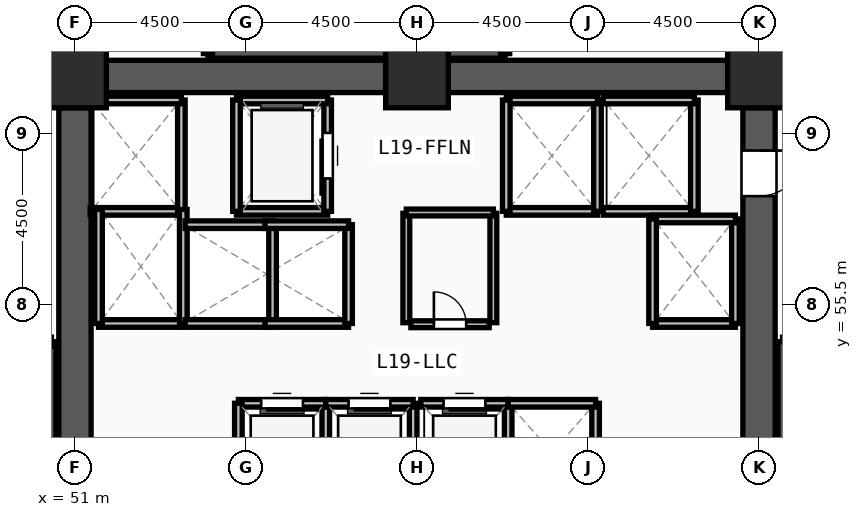
"""IFC4 building model, lengths in metres.
Left out: names, types, materials, properties, quantities, classifications, styles, units other than length and angle.
Written with IfcOpenShell. Run it as: python <this file> out.ifc"""

import sys

from ifc_helpers import new_model, si_unit, direction, frame, frame_2d, origin, origin_2d, place, context, subcontext, project, spatial, rectangle, extrude, source, transform, mapped, element, fill, save


model = new_model("IFC4")
c1 = context("Model", 3, precision=1e-05, world=origin(), true_north=direction((0.0, 1.0)))
c2 = subcontext(c1, "Body", "Model", "MODEL_VIEW")
j1 = project(units=[si_unit("LENGTHUNIT", "METRE"), si_unit("PLANEANGLEUNIT", "RADIAN")], contexts=[c1])
p1 = place(None, origin())
s1 = spatial("IfcSite", under=j1, at=p1, CompositionType="ELEMENT")
p2 = place(p1, origin())
s2 = spatial("IfcBuilding", under=s1, at=p2, CompositionType="ELEMENT")
p3 = place(p2, frame((0.0, 0.0, 74.25)))
s3 = spatial("IfcBuildingStorey", under=s2, at=p3, CompositionType="ELEMENT", Elevation=74.25)
m1 = source(origin(), c2, "Body", "SweptSolid", [
    extrude(rectangle(XDim=1.65, YDim=1.65, at=origin_2d()), origin(), (0.0, 0.0, 1.0), 3.75),
])
for number, where, z_axis, x_axis in (
    (1, (69.0, 61.5, 0.0), (0.0, 0.0, 1.0), (1.0, 0.0, 0.0)),
    (2, (60.0, 61.5, 0.0), (0.0, 0.0, 1.0), (1.0, 0.0, 0.0)),
    (3, (51.0, 61.5, 0.0), (0.0, 0.0, 1.0), (1.0, 0.0, 0.0)),
):
    element("IfcColumn", number, at=place(p3, frame(where, z_axis=z_axis, x_axis=x_axis)), inside=s3, PredefinedType="COLUMN", context=c2, shape_type="MappedRepresentation", body=[
        mapped(m1, transform((0.0, 0.0, 0.0), x_axis=(1.0, 0.0, 0.0), y_axis=(0.0, 1.0, 0.0), z_axis=(0.0, 0.0, 1.0), scale=1.0)),
    ])
for number, where, z_axis, x_axis in (
    (4, (51.825, 61.5, 0.0), (0.0, 0.0, 1.0), (1.0, 0.0, 0.0)),
    (5, (60.825, 61.5, 0.0), (0.0, 0.0, 1.0), (1.0, 0.0, 0.0)),
):
    element("IfcWall", number, at=place(p3, frame(where, z_axis=z_axis, x_axis=x_axis)), inside=s3, PredefinedType="SHEAR", context=c2, shape_type="SweptSolid", body=[
        extrude(rectangle(XDim=7.35, YDim=0.85, at=frame_2d((3.675, 0.0))), origin(), (0.0, 0.0, 1.0), 3.57),
    ])
p4 = place(p3, frame((69.0, 60.675, 0.0), z_axis=(0.0, 0.0, 1.0), x_axis=(0.0, -1.0, 0.0)))
e6 = element("IfcWall", 6, at=p4, inside=s3, PredefinedType="SHEAR", context=c2, shape_type="SweptSolid", body=[
    extrude(rectangle(XDim=13.35, YDim=0.85, at=frame_2d((6.675, 0.0))), origin(), (0.0, 0.0, 1.0), 3.57),
])
m2 = source(origin(), c2, "Body", "SweptSolid", [
    extrude(rectangle(XDim=1.2, YDim=2.2, at=frame_2d((0.6, 1.1))), frame((0.0, 0.435, 0.0), z_axis=(0.0, -1.0, 0.0), x_axis=(1.0, 0.0, 0.0)), (0.0, 0.0, 1.0), 0.87),
])
p5 = place(p4, frame((1.125, 0.0, 0.0)))
e7 = element("IfcOpeningElement", 7, at=p5, cuts=e6, PredefinedType="OPENING", context=c2, shape_type="MappedRepresentation", body=[
    mapped(m2, transform((0.0, 0.0, 0.0), x_axis=(1.0, 0.0, 0.0), y_axis=(0.0, 1.0, 0.0), z_axis=(0.0, 0.0, 1.0), scale=1.0)),
])
p6 = place(p3, frame((51.0, 47.325, 0.0), z_axis=(0.0, 0.0, 1.0), x_axis=(0.0, 1.0, 0.0)))
e8 = element("IfcWall", 8, at=p6, inside=s3, PredefinedType="SHEAR", context=c2, shape_type="SweptSolid", body=[
    extrude(rectangle(XDim=13.35, YDim=0.85, at=frame_2d((6.675, 0.0))), origin(), (0.0, 0.0, 1.0), 3.57),
])
for number, where, z_axis, x_axis in (
    (9, (50.38, 46.7, 0.0), (0.0, 0.0, 1.0), (0.0, 1.0, 0.0)),
    (10, (69.62, 54.52, 0.0), (0.0, 0.0, 1.0), (0.0, -1.0, 0.0)),
    (11, (54.5, 62.1, 0.0), (0.0, 0.0, 1.0), (1.0, 0.0, 0.0)),
):
    element("IfcWall", number, at=place(p3, frame(where, z_axis=z_axis, x_axis=x_axis)), inside=s3, PredefinedType="SOLIDWALL", context=c2, shape_type="SweptSolid", body=[
        extrude(rectangle(XDim=7.82, YDim=0.24, at=frame_2d((3.91, 0.0))), origin(), (0.0, 0.0, 1.0), 3.57),
    ])
for number, where, z_axis, x_axis in (
    (12, (62.32, 62.1, 0.0), (0.0, 0.0, 1.0), (0.0, 1.0, 0.0)),
    (13, (54.5, 65.54, 0.0), (0.0, 0.0, 1.0), (0.0, -1.0, 0.0)),
):
    element("IfcWall", number, at=place(p3, frame(where, z_axis=z_axis, x_axis=x_axis)), inside=s3, PredefinedType="SOLIDWALL", context=c2, shape_type="SweptSolid", body=[
        extrude(rectangle(XDim=3.44, YDim=0.24, at=frame_2d((1.72, 0.0))), origin(), (0.0, 0.0, 1.0), 3.57),
    ])
p7 = place(p3, frame((55.25, 57.95, 0.0), z_axis=(0.0, 0.0, 1.0), x_axis=(1.0, 0.0, 0.0)))
e14 = element("IfcWall", 14, at=p7, inside=s3, PredefinedType="SOLIDWALL", context=c2, shape_type="SweptSolid", body=[
    extrude(rectangle(XDim=2.4, YDim=0.2, at=frame_2d((1.2, 0.0))), origin(), (0.0, 0.0, 1.0), 3.57),
])
p8 = place(p3, frame((57.65, 57.95, 0.0), z_axis=(0.0, 0.0, 1.0), x_axis=(0.0, 1.0, 0.0)))
e15 = element("IfcWall", 15, at=p8, inside=s3, PredefinedType="SOLIDWALL", context=c2, shape_type="SweptSolid", body=[
    extrude(rectangle(XDim=2.93, YDim=0.2, at=frame_2d((1.465, 0.0))), origin(), (0.0, 0.0, 1.0), 3.57),
])
m3 = source(origin(), c2, "Body", "SweptSolid", [
    extrude(rectangle(XDim=1.2, YDim=2.3, at=frame_2d((0.6, 1.15))), frame((0.0, 0.11, 0.0), z_axis=(0.0, -1.0, 0.0), x_axis=(1.0, 0.0, 0.0)), (0.0, 0.0, 1.0), 0.22),
])
p9 = place(p8, frame((0.865, 0.0, 0.0)))
e16 = element("IfcOpeningElement", 16, at=p9, cuts=e15, PredefinedType="OPENING", context=c2, shape_type="MappedRepresentation", body=[
    mapped(m3, transform((0.0, 0.0, 0.0), x_axis=(1.0, 0.0, 0.0), y_axis=(0.0, 1.0, 0.0), z_axis=(0.0, 0.0, 1.0), scale=1.0)),
])
p10 = place(p3, frame((57.65, 60.88, 0.0), z_axis=(0.0, 0.0, 1.0), x_axis=(-1.0, 0.0, 0.0)))
e17 = element("IfcWall", 17, at=p10, inside=s3, PredefinedType="SOLIDWALL", context=c2, shape_type="SweptSolid", body=[
    extrude(rectangle(XDim=2.4, YDim=0.2, at=frame_2d((1.2, 0.0))), origin(), (0.0, 0.0, 1.0), 3.57),
])
p11 = place(p3, frame((55.25, 60.88, 0.0), z_axis=(0.0, 0.0, 1.0), x_axis=(0.0, -1.0, 0.0)))
e18 = element("IfcWall", 18, at=p11, inside=s3, PredefinedType="SOLIDWALL", context=c2, shape_type="SweptSolid", body=[
    extrude(rectangle(XDim=2.93, YDim=0.2, at=frame_2d((1.465, 0.0))), origin(), (0.0, 0.0, 1.0), 3.57),
])
p12 = place(p3, frame((62.35, 57.95, 0.0), z_axis=(0.0, 0.0, 1.0), x_axis=(1.0, 0.0, 0.0)))
e19 = element("IfcWall", 19, at=p12, inside=s3, PredefinedType="SOLIDWALL", context=c2, shape_type="SweptSolid", body=[
    extrude(rectangle(XDim=2.4, YDim=0.2, at=frame_2d((1.2, 0.0))), origin(), (0.0, 0.0, 1.0), 3.57),
])
p13 = place(p3, frame((64.75, 57.95, 0.0), z_axis=(0.0, 0.0, 1.0), x_axis=(0.0, 1.0, 0.0)))
e20 = element("IfcWall", 20, at=p13, inside=s3, PredefinedType="SOLIDWALL", context=c2, shape_type="SweptSolid", body=[
    extrude(rectangle(XDim=2.93, YDim=0.2, at=frame_2d((1.465, 0.0))), origin(), (0.0, 0.0, 1.0), 3.57),
])
p14 = place(p3, frame((64.75, 60.88, 0.0), z_axis=(0.0, 0.0, 1.0), x_axis=(-1.0, 0.0, 0.0)))
e21 = element("IfcWall", 21, at=p14, inside=s3, PredefinedType="SOLIDWALL", context=c2, shape_type="SweptSolid", body=[
    extrude(rectangle(XDim=2.4, YDim=0.2, at=frame_2d((1.2, 0.0))), origin(), (0.0, 0.0, 1.0), 3.57),
])
p15 = place(p3, frame((62.35, 60.88, 0.0), z_axis=(0.0, 0.0, 1.0), x_axis=(0.0, -1.0, 0.0)))
e22 = element("IfcWall", 22, at=p15, inside=s3, PredefinedType="SOLIDWALL", context=c2, shape_type="SweptSolid", body=[
    extrude(rectangle(XDim=2.93, YDim=0.2, at=frame_2d((1.465, 0.0))), origin(), (0.0, 0.0, 1.0), 3.57),
])
p16 = place(p3, frame((64.9, 57.95, 0.0), z_axis=(0.0, 0.0, 1.0), x_axis=(1.0, 0.0, 0.0)))
e23 = element("IfcWall", 23, at=p16, inside=s3, PredefinedType="SOLIDWALL", context=c2, shape_type="SweptSolid", body=[
    extrude(rectangle(XDim=2.4, YDim=0.2, at=frame_2d((1.2, 0.0))), origin(), (0.0, 0.0, 1.0), 3.57),
])
p17 = place(p3, frame((67.3, 57.95, 0.0), z_axis=(0.0, 0.0, 1.0), x_axis=(0.0, 1.0, 0.0)))
e24 = element("IfcWall", 24, at=p17, inside=s3, PredefinedType="SOLIDWALL", context=c2, shape_type="SweptSolid", body=[
    extrude(rectangle(XDim=2.93, YDim=0.2, at=frame_2d((1.465, 0.0))), origin(), (0.0, 0.0, 1.0), 3.57),
])
for number, where, z_axis, x_axis in (
    (25, (67.3, 60.88, 0.0), (0.0, 0.0, 1.0), (-1.0, 0.0, 0.0)),
    (26, (51.4, 57.95, 0.0), (0.0, 0.0, 1.0), (1.0, 0.0, 0.0)),
):
    element("IfcWall", number, at=place(p3, frame(where, z_axis=z_axis, x_axis=x_axis)), inside=s3, PredefinedType="SOLIDWALL", context=c2, shape_type="SweptSolid", body=[
        extrude(rectangle(XDim=2.4, YDim=0.2, at=frame_2d((1.2, 0.0))), origin(), (0.0, 0.0, 1.0), 3.57),
    ])
p18 = place(p3, frame((53.8, 57.95, 0.0), z_axis=(0.0, 0.0, 1.0), x_axis=(0.0, 1.0, 0.0)))
e27 = element("IfcWall", 27, at=p18, inside=s3, PredefinedType="SOLIDWALL", context=c2, shape_type="SweptSolid", body=[
    extrude(rectangle(XDim=2.93, YDim=0.2, at=frame_2d((1.465, 0.0))), origin(), (0.0, 0.0, 1.0), 3.57),
])
p19 = place(p3, frame((53.8, 60.88, 0.0), z_axis=(0.0, 0.0, 1.0), x_axis=(-1.0, 0.0, 0.0)))
e28 = element("IfcWall", 28, at=p19, inside=s3, PredefinedType="SOLIDWALL", context=c2, shape_type="SweptSolid", body=[
    extrude(rectangle(XDim=2.4, YDim=0.2, at=frame_2d((1.2, 0.0))), origin(), (0.0, 0.0, 1.0), 3.57),
])
p20 = place(p3, frame((51.62, 55.0, 0.0), z_axis=(0.0, 0.0, 1.0), x_axis=(1.0, 0.0, 0.0)))
e29 = element("IfcWall", 29, at=p20, inside=s3, PredefinedType="SOLIDWALL", context=c2, shape_type="SweptSolid", body=[
    extrude(rectangle(XDim=2.23, YDim=0.2, at=frame_2d((1.115, 0.0))), origin(), (0.0, 0.0, 1.0), 3.57),
])
for number, where, z_axis, x_axis in (
    (30, (53.85, 55.0, 0.0), (0.0, 0.0, 1.0), (0.0, 1.0, 0.0)),
    (31, (51.62, 58.0, 0.0), (0.0, 0.0, 1.0), (0.0, -1.0, 0.0)),
):
    element("IfcWall", number, at=place(p3, frame(where, z_axis=z_axis, x_axis=x_axis)), inside=s3, PredefinedType="SOLIDWALL", context=c2, shape_type="SweptSolid", body=[
        extrude(rectangle(XDim=3.0, YDim=0.2, at=frame_2d((1.5, 0.0))), origin(), (0.0, 0.0, 1.0), 3.57),
    ])
p21 = place(p3, frame((66.2, 55.0, 0.0), z_axis=(0.0, 0.0, 1.0), x_axis=(1.0, 0.0, 0.0)))
e32 = element("IfcWall", 32, at=p21, inside=s3, PredefinedType="SOLIDWALL", context=c2, shape_type="SweptSolid", body=[
    extrude(rectangle(XDim=2.18, YDim=0.2, at=frame_2d((1.09, 0.0))), origin(), (0.0, 0.0, 1.0), 3.57),
])
p22 = place(p3, frame((68.38, 55.0, 0.0), z_axis=(0.0, 0.0, 1.0), x_axis=(0.0, 1.0, 0.0)))
e33 = element("IfcWall", 33, at=p22, inside=s3, PredefinedType="SOLIDWALL", context=c2, shape_type="SweptSolid", body=[
    extrude(rectangle(XDim=2.75, YDim=0.2, at=frame_2d((1.375, 0.0))), origin(), (0.0, 0.0, 1.0), 3.57),
])
p23 = place(p3, frame((68.38, 57.75, 0.0), z_axis=(0.0, 0.0, 1.0), x_axis=(-1.0, 0.0, 0.0)))
e34 = element("IfcWall", 34, at=p23, inside=s3, PredefinedType="SOLIDWALL", context=c2, shape_type="SweptSolid", body=[
    extrude(rectangle(XDim=2.18, YDim=0.2, at=frame_2d((1.09, 0.0))), origin(), (0.0, 0.0, 1.0), 3.57),
])
p24 = place(p3, frame((66.2, 57.75, 0.0), z_axis=(0.0, 0.0, 1.0), x_axis=(0.0, -1.0, 0.0)))
e35 = element("IfcWall", 35, at=p24, inside=s3, PredefinedType="SOLIDWALL", context=c2, shape_type="SweptSolid", body=[
    extrude(rectangle(XDim=2.75, YDim=0.2, at=frame_2d((1.375, 0.0))), origin(), (0.0, 0.0, 1.0), 3.57),
])
p25 = place(p3, frame((57.6, 50.3, 0.0), z_axis=(0.0, 0.0, 1.0), x_axis=(0.0, 1.0, 0.0)))
e36 = element("IfcWall", 36, at=p25, inside=s3, PredefinedType="SOLIDWALL", context=c2, shape_type="SweptSolid", body=[
    extrude(rectangle(XDim=2.6, YDim=0.2, at=frame_2d((1.3, 0.0))), origin(), (0.0, 0.0, 1.0), 3.57),
])
p26 = place(p3, frame((57.6, 52.9, 0.0), z_axis=(0.0, 0.0, 1.0), x_axis=(-1.0, 0.0, 0.0)))
e37 = element("IfcWall", 37, at=p26, inside=s3, PredefinedType="SOLIDWALL", context=c2, shape_type="SweptSolid", body=[
    extrude(rectangle(XDim=2.3, YDim=0.2, at=frame_2d((1.15, 0.0))), origin(), (0.0, 0.0, 1.0), 3.57),
])
m4 = source(origin(), c2, "Body", "SweptSolid", [
    extrude(rectangle(XDim=1.1, YDim=2.2, at=frame_2d((0.55, 1.1))), frame((0.0, 0.11, 0.0), z_axis=(0.0, -1.0, 0.0), x_axis=(1.0, 0.0, 0.0)), (0.0, 0.0, 1.0), 0.22),
])
p27 = place(p26, frame((0.6, 0.0, 0.0)))
e38 = element("IfcOpeningElement", 38, at=p27, cuts=e37, PredefinedType="OPENING", context=c2, shape_type="MappedRepresentation", body=[
    mapped(m4, transform((0.0, 0.0, 0.0), x_axis=(1.0, 0.0, 0.0), y_axis=(0.0, 1.0, 0.0), z_axis=(0.0, 0.0, 1.0), scale=1.0)),
])
for number, where, z_axis, x_axis in (
    (39, (55.3, 52.9, 0.0), (0.0, 0.0, 1.0), (0.0, -1.0, 0.0)),
    (40, (59.9, 50.3, 0.0), (0.0, 0.0, 1.0), (0.0, 1.0, 0.0)),
):
    element("IfcWall", number, at=place(p3, frame(where, z_axis=z_axis, x_axis=x_axis)), inside=s3, PredefinedType="SOLIDWALL", context=c2, shape_type="SweptSolid", body=[
        extrude(rectangle(XDim=2.6, YDim=0.2, at=frame_2d((1.3, 0.0))), origin(), (0.0, 0.0, 1.0), 3.57),
    ])
p28 = place(p3, frame((59.9, 52.9, 0.0), z_axis=(0.0, 0.0, 1.0), x_axis=(-1.0, 0.0, 0.0)))
e41 = element("IfcWall", 41, at=p28, inside=s3, PredefinedType="SOLIDWALL", context=c2, shape_type="SweptSolid", body=[
    extrude(rectangle(XDim=2.3, YDim=0.2, at=frame_2d((1.15, 0.0))), origin(), (0.0, 0.0, 1.0), 3.57),
])
p29 = place(p28, frame((0.6, 0.0, 0.0)))
e42 = element("IfcOpeningElement", 42, at=p29, cuts=e41, PredefinedType="OPENING", context=c2, shape_type="MappedRepresentation", body=[
    mapped(m4, transform((0.0, 0.0, 0.0), x_axis=(1.0, 0.0, 0.0), y_axis=(0.0, 1.0, 0.0), z_axis=(0.0, 0.0, 1.0), scale=1.0)),
])
p30 = place(p3, frame((62.4, 50.3, 0.0), z_axis=(0.0, 0.0, 1.0), x_axis=(0.0, 1.0, 0.0)))
e43 = element("IfcWall", 43, at=p30, inside=s3, PredefinedType="SOLIDWALL", context=c2, shape_type="SweptSolid", body=[
    extrude(rectangle(XDim=2.6, YDim=0.2, at=frame_2d((1.3, 0.0))), origin(), (0.0, 0.0, 1.0), 3.57),
])
p31 = place(p3, frame((62.4, 52.9, 0.0), z_axis=(0.0, 0.0, 1.0), x_axis=(-1.0, 0.0, 0.0)))
e44 = element("IfcWall", 44, at=p31, inside=s3, PredefinedType="SOLIDWALL", context=c2, shape_type="SweptSolid", body=[
    extrude(rectangle(XDim=2.3, YDim=0.2, at=frame_2d((1.15, 0.0))), origin(), (0.0, 0.0, 1.0), 3.57),
])
p32 = place(p31, frame((0.6, 0.0, 0.0)))
e45 = element("IfcOpeningElement", 45, at=p32, cuts=e44, PredefinedType="OPENING", context=c2, shape_type="MappedRepresentation", body=[
    mapped(m4, transform((0.0, 0.0, 0.0), x_axis=(1.0, 0.0, 0.0), y_axis=(0.0, 1.0, 0.0), z_axis=(0.0, 0.0, 1.0), scale=1.0)),
])
p33 = place(p3, frame((64.7, 50.3, 0.0), z_axis=(0.0, 0.0, 1.0), x_axis=(0.0, 1.0, 0.0)))
e46 = element("IfcWall", 46, at=p33, inside=s3, PredefinedType="SOLIDWALL", context=c2, shape_type="SweptSolid", body=[
    extrude(rectangle(XDim=2.6, YDim=0.2, at=frame_2d((1.3, 0.0))), origin(), (0.0, 0.0, 1.0), 3.57),
])
for number, where, z_axis, x_axis in (
    (47, (64.7, 52.9, 0.0), (0.0, 0.0, 1.0), (-1.0, 0.0, 0.0)),
    (48, (53.9, 55.0, 0.0), (0.0, 0.0, 1.0), (1.0, 0.0, 0.0)),
):
    element("IfcWall", number, at=place(p3, frame(where, z_axis=z_axis, x_axis=x_axis)), inside=s3, PredefinedType="SOLIDWALL", context=c2, shape_type="SweptSolid", body=[
        extrude(rectangle(XDim=2.3, YDim=0.2, at=frame_2d((1.15, 0.0))), origin(), (0.0, 0.0, 1.0), 3.57),
    ])
p34 = place(p3, frame((56.2, 55.0, 0.0), z_axis=(0.0, 0.0, 1.0), x_axis=(0.0, 1.0, 0.0)))
e49 = element("IfcWall", 49, at=p34, inside=s3, PredefinedType="SOLIDWALL", context=c2, shape_type="SweptSolid", body=[
    extrude(rectangle(XDim=2.6, YDim=0.2, at=frame_2d((1.3, 0.0))), origin(), (0.0, 0.0, 1.0), 3.57),
])
p35 = place(p3, frame((56.2, 57.6, 0.0), z_axis=(0.0, 0.0, 1.0), x_axis=(-1.0, 0.0, 0.0)))
e50 = element("IfcWall", 50, at=p35, inside=s3, PredefinedType="SOLIDWALL", context=c2, shape_type="SweptSolid", body=[
    extrude(rectangle(XDim=2.3, YDim=0.2, at=frame_2d((1.15, 0.0))), origin(), (0.0, 0.0, 1.0), 3.57),
])
p36 = place(p3, frame((56.0, 55.0, 0.0), z_axis=(0.0, 0.0, 1.0), x_axis=(1.0, 0.0, 0.0)))
e51 = element("IfcWall", 51, at=p36, inside=s3, PredefinedType="SOLIDWALL", context=c2, shape_type="SweptSolid", body=[
    extrude(rectangle(XDim=2.2, YDim=0.2, at=frame_2d((1.1, 0.0))), origin(), (0.0, 0.0, 1.0), 3.57),
])
p37 = place(p3, frame((58.2, 55.0, 0.0), z_axis=(0.0, 0.0, 1.0), x_axis=(0.0, 1.0, 0.0)))
e52 = element("IfcWall", 52, at=p37, inside=s3, PredefinedType="SOLIDWALL", context=c2, shape_type="SweptSolid", body=[
    extrude(rectangle(XDim=2.6, YDim=0.2, at=frame_2d((1.3, 0.0))), origin(), (0.0, 0.0, 1.0), 3.57),
])
p38 = place(p3, frame((58.2, 57.6, 0.0), z_axis=(0.0, 0.0, 1.0), x_axis=(-1.0, 0.0, 0.0)))
e53 = element("IfcWall", 53, at=p38, inside=s3, PredefinedType="SOLIDWALL", context=c2, shape_type="SweptSolid", body=[
    extrude(rectangle(XDim=2.2, YDim=0.2, at=frame_2d((1.1, 0.0))), origin(), (0.0, 0.0, 1.0), 3.57),
])
p39 = place(p3, frame((59.84, 54.98, 0.0), z_axis=(0.0, 0.0, 1.0), x_axis=(1.0, 0.0, 0.0)))
e54 = element("IfcWall", 54, at=p39, inside=s3, PredefinedType="PARTITIONING", context=c2, shape_type="SweptSolid", body=[
    extrude(rectangle(XDim=2.06, YDim=0.18, at=frame_2d((1.03, 0.0))), origin(), (0.0, 0.0, 1.0), 3.57),
])
m5 = source(origin(), c2, "Body", "SweptSolid", [
    extrude(rectangle(XDim=0.85, YDim=2.1, at=frame_2d((0.425, 1.05))), frame((0.0, 0.1, 0.0), z_axis=(0.0, -1.0, 0.0), x_axis=(1.0, 0.0, 0.0)), (0.0, 0.0, 1.0), 0.2),
])
p40 = place(p39, frame((0.605, 0.0, 0.0)))
e55 = element("IfcOpeningElement", 55, at=p40, cuts=e54, PredefinedType="OPENING", context=c2, shape_type="MappedRepresentation", body=[
    mapped(m5, transform((0.0, 0.0, 0.0), x_axis=(1.0, 0.0, 0.0), y_axis=(0.0, 1.0, 0.0), z_axis=(0.0, 0.0, 1.0), scale=1.0)),
])
for number, where, z_axis, x_axis in (
    (56, (59.72, 55.02, 0.0), (0.0, 0.0, 1.0), (0.0, 1.0, 0.0)),
    (57, (62.01, 55.02, 0.0), (0.0, 0.0, 1.0), (0.0, 1.0, 0.0)),
):
    element("IfcWall", number, at=place(p3, frame(where, z_axis=z_axis, x_axis=x_axis)), inside=s3, PredefinedType="PARTITIONING", context=c2, shape_type="SweptSolid", body=[
        extrude(rectangle(XDim=2.88, YDim=0.18, at=frame_2d((1.44, 0.0))), origin(), (0.0, 0.0, 1.0), 3.57),
    ])
p41 = place(p3, frame((59.72, 57.92, 0.0), z_axis=(0.0, 0.0, 1.0), x_axis=(1.0, 0.0, 0.0)))
e58 = element("IfcWall", 58, at=p41, inside=s3, PredefinedType="PARTITIONING", context=c2, shape_type="SweptSolid", body=[
    extrude(rectangle(XDim=2.29, YDim=0.18, at=frame_2d((1.145, 0.0))), origin(), (0.0, 0.0, 1.0), 3.57),
])
for number, where, z_axis, x_axis in (
    (59, (50.54, 61.95, 0.0), (0.0, 0.0, 1.0), (0.0, 1.0, 0.0)),
    (60, (69.46, 61.95, 0.0), (0.0, 0.0, 1.0), (0.0, 1.0, 0.0)),
):
    element("IfcWall", number, at=place(p3, frame(where, z_axis=z_axis, x_axis=x_axis)), inside=s3, PredefinedType="PARTITIONING", context=c2, shape_type="SweptSolid", body=[
        extrude(rectangle(XDim=3.63, YDim=0.18, at=frame_2d((1.815, 0.0))), origin(), (0.0, 0.0, 1.0), 3.57),
    ])
m6 = source(origin(), c2, "Body", "SweptSolid", [
    extrude(rectangle(XDim=1.2, YDim=2.2, at=frame_2d((0.6, 1.1))), frame((0.0, 0.025, 0.0), z_axis=(0.0, -1.0, 0.0), x_axis=(1.0, 0.0, 0.0)), (0.0, 0.0, 1.0), 0.05),
])
p42 = place(p5, origin())
e61 = element("IfcDoor", 61, at=p42, inside=s3, OperationType="SINGLE_SWING_LEFT", PredefinedType="DOOR", context=c2, shape_type="MappedRepresentation", body=[
    mapped(m6, transform((0.0, 0.0, 0.0), x_axis=(1.0, 0.0, 0.0), y_axis=(0.0, 1.0, 0.0), z_axis=(0.0, 0.0, 1.0), scale=1.0)),
])
fill(e7, e61)
m7 = source(origin(), c2, "Body", "SweptSolid", [
    extrude(rectangle(XDim=1.2, YDim=2.3, at=frame_2d((0.6, 1.15))), frame((0.0, 0.025, 0.0), z_axis=(0.0, -1.0, 0.0), x_axis=(1.0, 0.0, 0.0)), (0.0, 0.0, 1.0), 0.05),
])
p43 = place(p9, origin())
e62 = element("IfcDoor", 62, at=p43, inside=s3, OperationType="SLIDING_TO_LEFT", PredefinedType="DOOR", context=c2, shape_type="MappedRepresentation", body=[
    mapped(m7, transform((0.0, 0.0, 0.0), x_axis=(1.0, 0.0, 0.0), y_axis=(0.0, 1.0, 0.0), z_axis=(0.0, 0.0, 1.0), scale=1.0)),
])
fill(e16, e62)
m8 = source(origin(), c2, "Body", "SweptSolid", [
    extrude(rectangle(XDim=1.1, YDim=2.2, at=frame_2d((0.55, 1.1))), frame((0.0, 0.025, 0.0), z_axis=(0.0, -1.0, 0.0), x_axis=(1.0, 0.0, 0.0)), (0.0, 0.0, 1.0), 0.05),
])
p44 = place(p27, origin())
e63 = element("IfcDoor", 63, at=p44, inside=s3, OperationType="SLIDING_TO_LEFT", PredefinedType="DOOR", context=c2, shape_type="MappedRepresentation", body=[
    mapped(m8, transform((0.0, 0.0, 0.0), x_axis=(1.0, 0.0, 0.0), y_axis=(0.0, 1.0, 0.0), z_axis=(0.0, 0.0, 1.0), scale=1.0)),
])
fill(e38, e63)
p45 = place(p29, origin())
e64 = element("IfcDoor", 64, at=p45, inside=s3, OperationType="SLIDING_TO_LEFT", PredefinedType="DOOR", context=c2, shape_type="MappedRepresentation", body=[
    mapped(m8, transform((0.0, 0.0, 0.0), x_axis=(1.0, 0.0, 0.0), y_axis=(0.0, 1.0, 0.0), z_axis=(0.0, 0.0, 1.0), scale=1.0)),
])
fill(e42, e64)
p46 = place(p32, origin())
e65 = element("IfcDoor", 65, at=p46, inside=s3, OperationType="SLIDING_TO_LEFT", PredefinedType="DOOR", context=c2, shape_type="MappedRepresentation", body=[
    mapped(m8, transform((0.0, 0.0, 0.0), x_axis=(1.0, 0.0, 0.0), y_axis=(0.0, 1.0, 0.0), z_axis=(0.0, 0.0, 1.0), scale=1.0)),
])
fill(e45, e65)
m9 = source(origin(), c2, "Body", "SweptSolid", [
    extrude(rectangle(XDim=0.85, YDim=2.1, at=frame_2d((0.425, 1.05))), frame((0.0, 0.025, 0.0), z_axis=(0.0, -1.0, 0.0), x_axis=(1.0, 0.0, 0.0)), (0.0, 0.0, 1.0), 0.05),
])
p47 = place(p40, origin())
e66 = element("IfcDoor", 66, at=p47, inside=s3, OperationType="SINGLE_SWING_LEFT", PredefinedType="DOOR", context=c2, shape_type="MappedRepresentation", body=[
    mapped(m9, transform((0.0, 0.0, 0.0), x_axis=(1.0, 0.0, 0.0), y_axis=(0.0, 1.0, 0.0), z_axis=(0.0, 0.0, 1.0), scale=1.0)),
])
fill(e55, e66)
save(model, sys.argv[1])
